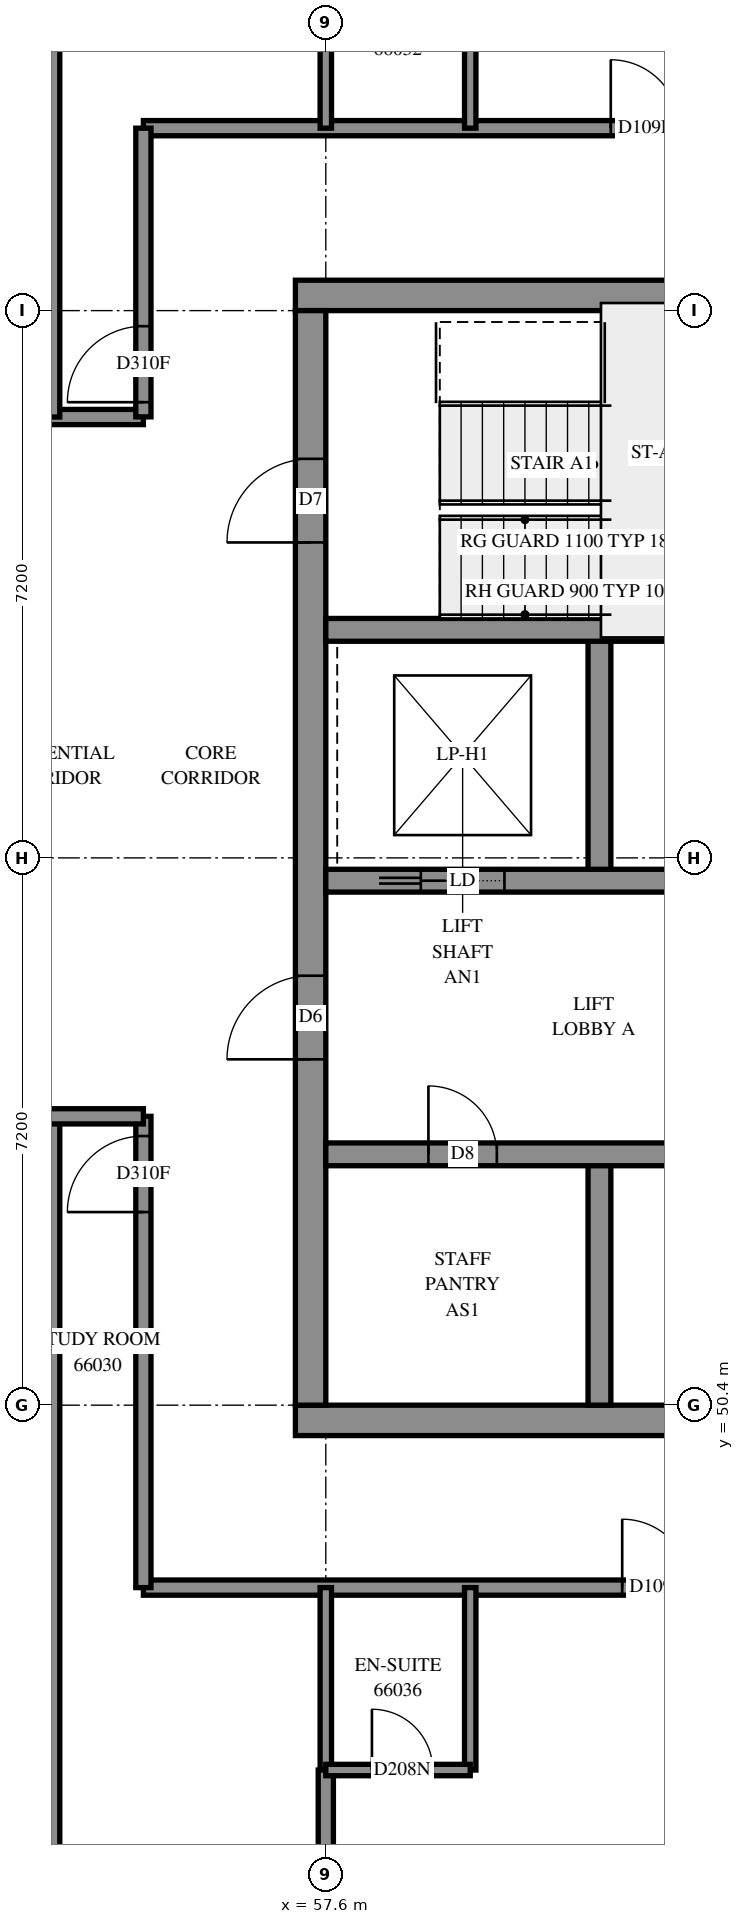
"""IFC4 building model, lengths in metres.
Left out: names, types, materials, properties, quantities, classifications, styles, units other than length and angle.
Written with IfcOpenShell. Run it as: python <this file> out.ifc"""

import sys

from ifc_helpers import new_model, si_unit, direction, frame, frame_2d, origin, place, context, subcontext, project, spatial, rectangle, extrude, element, fill, save


model = new_model("IFC4")
c1 = context("Model", 3, precision=1e-05, world=origin(), true_north=direction((0.0, 1.0)))
c2 = subcontext(c1, "Body", "Model", "MODEL_VIEW")
j1 = project(units=[si_unit("LENGTHUNIT", "METRE"), si_unit("PLANEANGLEUNIT", "RADIAN")], contexts=[c1])
p1 = place(None, origin())
s1 = spatial("IfcSite", under=j1, at=p1, CompositionType="ELEMENT")
p2 = place(p1, origin())
s2 = spatial("IfcBuilding", under=s1, at=p2, CompositionType="ELEMENT")
p3 = place(p2, frame((0.0, 0.0, 243.8)))
s3 = spatial("IfcBuildingStorey", under=s2, at=p3, CompositionType="ELEMENT", Elevation=243.8)
p4 = place(p3, frame((57.2, 50.2, -0.3), z_axis=(0.0, 0.0, 1.0), x_axis=(1.0, 0.0, 0.0)))
e1 = element("IfcWall", 1, at=p4, inside=s3, PredefinedType="SHEAR", context=c2, shape_type="SweptSolid", body=[
    extrude(rectangle(XDim=15.2, YDim=0.4, at=frame_2d((7.6, 0.0))), origin(), (0.0, 0.0, 1.0), 2.7),
])
p5 = place(p3, frame((57.2, 65.0, -0.3), z_axis=(0.0, 0.0, 1.0), x_axis=(1.0, 0.0, 0.0)))
e2 = element("IfcWall", 2, at=p5, inside=s3, PredefinedType="SHEAR", context=c2, shape_type="SweptSolid", body=[
    extrude(rectangle(XDim=15.2, YDim=0.4, at=frame_2d((7.6, 0.0))), origin(), (0.0, 0.0, 1.0), 2.7),
])
p6 = place(p5, frame((10.4, 0.0, 0.3)))
e3 = element("IfcOpeningElement", 3, at=p6, cuts=e2, PredefinedType="OPENING", context=c2, shape_type="SweptSolid", body=[
    extrude(rectangle(XDim=0.8, YDim=2.1, at=frame_2d((0.4, 1.05))), frame((0.0, 0.21, 0.0), z_axis=(0.0, -1.0, 0.0), x_axis=(1.0, 0.0, 0.0)), (0.0, 0.0, 1.0), 0.42),
])
p7 = place(p3, frame((57.4, 50.4, -0.3), z_axis=(0.0, 0.0, 1.0), x_axis=(0.0, 1.0, 0.0)))
e4 = element("IfcWall", 4, at=p7, inside=s3, PredefinedType="SHEAR", context=c2, shape_type="SweptSolid", body=[
    extrude(rectangle(XDim=14.4, YDim=0.4, at=frame_2d((7.2, 0.0))), origin(), (0.0, 0.0, 1.0), 2.7),
])
p8 = place(p7, frame((4.55, 0.0, 0.3)))
e5 = element("IfcOpeningElement", 5, at=p8, cuts=e4, PredefinedType="OPENING", context=c2, shape_type="SweptSolid", body=[
    extrude(rectangle(XDim=1.1, YDim=2.1, at=frame_2d((0.55, 1.05))), frame((0.0, 0.21, 0.0), z_axis=(0.0, -1.0, 0.0), x_axis=(1.0, 0.0, 0.0)), (0.0, 0.0, 1.0), 0.42),
])
p9 = place(p7, frame((11.35, 0.0, 0.3)))
e6 = element("IfcOpeningElement", 6, at=p9, cuts=e4, PredefinedType="OPENING", context=c2, shape_type="SweptSolid", body=[
    extrude(rectangle(XDim=1.1, YDim=2.1, at=frame_2d((0.55, 1.05))), frame((0.0, 0.21, 0.0), z_axis=(0.0, -1.0, 0.0), x_axis=(1.0, 0.0, 0.0)), (0.0, 0.0, 1.0), 0.42),
])
for number, where, z_axis, x_axis in (
    (7, (61.2, 50.4, 0.0), (0.0, 0.0, 1.0), (0.0, 1.0, 0.0)),
    (8, (61.2, 57.3, 0.0), (0.0, 0.0, 1.0), (0.0, 1.0, 0.0)),
):
    element("IfcWall", number, at=place(p3, frame(where, z_axis=z_axis, x_axis=x_axis)), inside=s3, PredefinedType="SOLIDWALL", context=c2, shape_type="SweptSolid", body=[
        extrude(rectangle(XDim=3.3, YDim=0.3, at=frame_2d((1.65, 0.0))), origin(), (0.0, 0.0, 1.0), 3.1),
    ])
p10 = place(p3, frame((57.6, 53.7, 0.0), z_axis=(0.0, 0.0, 1.0), x_axis=(1.0, 0.0, 0.0)))
e9 = element("IfcWall", 9, at=p10, inside=s3, PredefinedType="SOLIDWALL", context=c2, shape_type="SweptSolid", body=[
    extrude(rectangle(XDim=14.4, YDim=0.3, at=frame_2d((7.2, 0.0))), origin(), (0.0, 0.0, 1.0), 3.1),
])
p11 = place(p10, frame((1.35, 0.0, 0.0)))
e10 = element("IfcOpeningElement", 10, at=p11, cuts=e9, PredefinedType="OPENING", context=c2, shape_type="SweptSolid", body=[
    extrude(rectangle(XDim=0.9, YDim=2.1, at=frame_2d((0.45, 1.05))), frame((0.0, 0.16, 0.0), z_axis=(0.0, -1.0, 0.0), x_axis=(1.0, 0.0, 0.0)), (0.0, 0.0, 1.0), 0.32),
])
p12 = place(p10, frame((4.95, 0.0, 0.0)))
e11 = element("IfcOpeningElement", 11, at=p12, cuts=e9, PredefinedType="OPENING", context=c2, shape_type="SweptSolid", body=[
    extrude(rectangle(XDim=0.9, YDim=2.1, at=frame_2d((0.45, 1.05))), frame((0.0, 0.16, 0.0), z_axis=(0.0, -1.0, 0.0), x_axis=(1.0, 0.0, 0.0)), (0.0, 0.0, 1.0), 0.32),
])
p13 = place(p10, frame((8.55, 0.0, 0.0)))
e12 = element("IfcOpeningElement", 12, at=p13, cuts=e9, PredefinedType="OPENING", context=c2, shape_type="SweptSolid", body=[
    extrude(rectangle(XDim=0.9, YDim=2.1, at=frame_2d((0.45, 1.05))), frame((0.0, 0.16, 0.0), z_axis=(0.0, -1.0, 0.0), x_axis=(1.0, 0.0, 0.0)), (0.0, 0.0, 1.0), 0.32),
])
p14 = place(p10, frame((12.05, 0.0, 0.0)))
e13 = element("IfcOpeningElement", 13, at=p14, cuts=e9, PredefinedType="OPENING", context=c2, shape_type="SweptSolid", body=[
    extrude(rectangle(XDim=1.1, YDim=2.1, at=frame_2d((0.55, 1.05))), frame((0.0, 0.16, 0.0), z_axis=(0.0, -1.0, 0.0), x_axis=(1.0, 0.0, 0.0)), (0.0, 0.0, 1.0), 0.32),
])
p15 = place(p3, frame((57.6, 57.3, 0.0), z_axis=(0.0, 0.0, 1.0), x_axis=(1.0, 0.0, 0.0)))
e14 = element("IfcWall", 14, at=p15, inside=s3, PredefinedType="SOLIDWALL", context=c2, shape_type="SweptSolid", body=[
    extrude(rectangle(XDim=14.4, YDim=0.3, at=frame_2d((7.2, 0.0))), origin(), (0.0, 0.0, 1.0), 3.1),
])
p16 = place(p15, frame((8.55, 0.0, 0.0)))
e15 = element("IfcOpeningElement", 15, at=p16, cuts=e14, PredefinedType="OPENING", context=c2, shape_type="SweptSolid", body=[
    extrude(rectangle(XDim=0.9, YDim=2.1, at=frame_2d((0.45, 1.05))), frame((0.0, 0.16, 0.0), z_axis=(0.0, -1.0, 0.0), x_axis=(1.0, 0.0, 0.0)), (0.0, 0.0, 1.0), 0.32),
])
p17 = place(p15, frame((1.25, 0.0, 0.0)))
e16 = element("IfcOpeningElement", 16, at=p17, cuts=e14, PredefinedType="OPENING", context=c2, shape_type="SweptSolid", body=[
    extrude(rectangle(XDim=1.1, YDim=2.1, at=frame_2d((0.55, 1.05))), frame((0.0, 0.16, 0.0), z_axis=(0.0, -1.0, 0.0), x_axis=(1.0, 0.0, 0.0)), (0.0, 0.0, 1.0), 0.32),
])
p18 = place(p15, frame((4.85, 0.0, 0.0)))
e17 = element("IfcOpeningElement", 17, at=p18, cuts=e14, PredefinedType="OPENING", context=c2, shape_type="SweptSolid", body=[
    extrude(rectangle(XDim=1.1, YDim=2.1, at=frame_2d((0.55, 1.05))), frame((0.0, 0.16, 0.0), z_axis=(0.0, -1.0, 0.0), x_axis=(1.0, 0.0, 0.0)), (0.0, 0.0, 1.0), 0.32),
])
p19 = place(p15, frame((12.05, 0.0, 0.0)))
e18 = element("IfcOpeningElement", 18, at=p19, cuts=e14, PredefinedType="OPENING", context=c2, shape_type="SweptSolid", body=[
    extrude(rectangle(XDim=1.1, YDim=2.1, at=frame_2d((0.55, 1.05))), frame((0.0, 0.16, 0.0), z_axis=(0.0, -1.0, 0.0), x_axis=(1.0, 0.0, 0.0)), (0.0, 0.0, 1.0), 0.32),
])
p20 = place(p3, frame((57.6, 60.6, 0.0), z_axis=(0.0, 0.0, 1.0), x_axis=(1.0, 0.0, 0.0)))
e19 = element("IfcWall", 19, at=p20, inside=s3, PredefinedType="SOLIDWALL", context=c2, shape_type="SweptSolid", body=[
    extrude(rectangle(XDim=7.2, YDim=0.3, at=frame_2d((3.6, 0.0))), origin(), (0.0, 0.0, 1.0), 3.1),
])
p21 = place(p3, frame((55.2, 67.2, 0.0), z_axis=(0.0, 0.0, 1.0), x_axis=(1.0, 0.0, 0.0)))
e20 = element("IfcWall", 20, at=p21, inside=s3, PredefinedType="PARTITIONING", context=c2, shape_type="SweptSolid", body=[
    extrude(rectangle(XDim=19.2, YDim=0.2, at=frame_2d((9.6, 0.0))), origin(), (0.0, 0.0, 1.0), 3.1),
])
p22 = place(p21, frame((6.149, 0.0, 0.0)))
e21 = element("IfcOpeningElement", 21, at=p22, cuts=e20, PredefinedType="OPENING", context=c2, shape_type="SweptSolid", body=[
    extrude(rectangle(XDim=0.9, YDim=2.1, at=frame_2d((0.45, 1.05))), frame((0.0, 0.11, 0.0), z_axis=(0.0, -1.0, 0.0), x_axis=(1.0, 0.0, 0.0)), (0.0, 0.0, 1.0), 0.22),
])
p23 = place(p21, frame((13.499, 0.0, 0.0)))
e22 = element("IfcOpeningElement", 22, at=p23, cuts=e20, PredefinedType="OPENING", context=c2, shape_type="SweptSolid", body=[
    extrude(rectangle(XDim=0.9, YDim=2.1, at=frame_2d((0.45, 1.05))), frame((0.0, 0.11, 0.0), z_axis=(0.0, -1.0, 0.0), x_axis=(1.0, 0.0, 0.0)), (0.0, 0.0, 1.0), 0.22),
])
p24 = place(p3, frame((55.2, 48.0, 0.0), z_axis=(0.0, 0.0, 1.0), x_axis=(1.0, 0.0, 0.0)))
e23 = element("IfcWall", 23, at=p24, inside=s3, PredefinedType="PARTITIONING", context=c2, shape_type="SweptSolid", body=[
    extrude(rectangle(XDim=19.15, YDim=0.2, at=frame_2d((9.575, 0.0))), origin(), (0.0, 0.0, 1.0), 3.1),
])
p25 = place(p24, frame((6.299, 0.0, 0.0)))
e24 = element("IfcOpeningElement", 24, at=p25, cuts=e23, PredefinedType="OPENING", context=c2, shape_type="SweptSolid", body=[
    extrude(rectangle(XDim=0.9, YDim=2.1, at=frame_2d((0.45, 1.05))), frame((0.0, 0.11, 0.0), z_axis=(0.0, -1.0, 0.0), x_axis=(1.0, 0.0, 0.0)), (0.0, 0.0, 1.0), 0.22),
])
p26 = place(p24, frame((13.499, 0.0, 0.0)))
e25 = element("IfcOpeningElement", 25, at=p26, cuts=e23, PredefinedType="OPENING", context=c2, shape_type="SweptSolid", body=[
    extrude(rectangle(XDim=0.9, YDim=2.1, at=frame_2d((0.45, 1.05))), frame((0.0, 0.11, 0.0), z_axis=(0.0, -1.0, 0.0), x_axis=(1.0, 0.0, 0.0)), (0.0, 0.0, 1.0), 0.22),
])
p27 = place(p3, frame((40.61, 63.4, 0.0), z_axis=(0.0, 0.0, 1.0), x_axis=(1.0, 0.0, 0.0)))
e26 = element("IfcWall", 26, at=p27, inside=s3, PredefinedType="PARTITIONING", context=c2, shape_type="SweptSolid", body=[
    extrude(rectangle(XDim=14.59, YDim=0.2, at=frame_2d((7.295, 0.0))), origin(), (0.0, 0.0, 1.0), 3.1),
])
p28 = place(p27, frame((6.3, 0.0, 0.0)))
e27 = element("IfcOpeningElement", 27, at=p28, cuts=e26, PredefinedType="OPENING", context=c2, shape_type="SweptSolid", body=[
    extrude(rectangle(XDim=1.0, YDim=2.1, at=frame_2d((0.5, 1.05))), frame((0.0, 0.11, 0.0), z_axis=(0.0, -1.0, 0.0), x_axis=(1.0, 0.0, 0.0)), (0.0, 0.0, 1.0), 0.22),
])
p29 = place(p27, frame((11.73, 0.0, 0.0)))
e28 = element("IfcOpeningElement", 28, at=p29, cuts=e26, PredefinedType="OPENING", context=c2, shape_type="SweptSolid", body=[
    extrude(rectangle(XDim=1.0, YDim=2.1, at=frame_2d((0.5, 1.05))), frame((0.0, 0.11, 0.0), z_axis=(0.0, -1.0, 0.0), x_axis=(1.0, 0.0, 0.0)), (0.0, 0.0, 1.0), 0.22),
])
p30 = place(p3, frame((54.0, 42.35, 0.0), z_axis=(0.0, 0.0, 1.0), x_axis=(0.0, 1.0, 0.0)))
e29 = element("IfcWall", 29, at=p30, inside=s3, PredefinedType="PARTITIONING", context=c2, shape_type="SweptSolid", body=[
    extrude(rectangle(XDim=11.85, YDim=0.2, at=frame_2d((5.925, 0.0))), origin(), (0.0, 0.0, 1.0), 3.1),
])
p31 = place(p3, frame((54.0, 63.4, 0.0), z_axis=(0.0, 0.0, 1.0), x_axis=(0.0, 1.0, 0.0)))
e30 = element("IfcWall", 30, at=p31, inside=s3, PredefinedType="PARTITIONING", context=c2, shape_type="SweptSolid", body=[
    extrude(rectangle(XDim=9.397, YDim=0.2, at=frame_2d((4.699, 0.0))), origin(), (0.0, 0.0, 1.0), 3.1),
])
p32 = place(p3, frame((55.2, 48.0, 0.0), z_axis=(0.0, 0.0, 1.0), x_axis=(0.0, 1.0, 0.0)))
e31 = element("IfcWall", 31, at=p32, inside=s3, PredefinedType="PARTITIONING", context=c2, shape_type="SweptSolid", body=[
    extrude(rectangle(XDim=6.2, YDim=0.2, at=frame_2d((3.1, 0.0))), origin(), (0.0, 0.0, 1.0), 3.1),
])
p33 = place(p32, frame((4.94, 0.0, 0.0)))
e32 = element("IfcOpeningElement", 32, at=p33, cuts=e31, PredefinedType="OPENING", context=c2, shape_type="SweptSolid", body=[
    extrude(rectangle(XDim=1.0, YDim=2.1, at=frame_2d((0.5, 1.05))), frame((0.0, 0.11, 0.0), z_axis=(0.0, -1.0, 0.0), x_axis=(1.0, 0.0, 0.0)), (0.0, 0.0, 1.0), 0.22),
])
p34 = place(p3, frame((50.4, 54.2, 0.0), z_axis=(0.0, 0.0, 1.0), x_axis=(1.0, 0.0, 0.0)))
e33 = element("IfcWall", 33, at=p34, inside=s3, PredefinedType="PARTITIONING", context=c2, shape_type="SweptSolid", body=[
    extrude(rectangle(XDim=4.8, YDim=0.2, at=frame_2d((2.4, 0.0))), origin(), (0.0, 0.0, 1.0), 3.1),
])
p35 = place(p34, frame((2.033, 0.0, 0.0)))
e34 = element("IfcOpeningElement", 34, at=p35, cuts=e33, PredefinedType="OPENING", context=c2, shape_type="SweptSolid", body=[
    extrude(rectangle(XDim=1.0, YDim=2.1, at=frame_2d((0.5, 1.05))), frame((0.0, 0.11, 0.0), z_axis=(0.0, -1.0, 0.0), x_axis=(1.0, 0.0, 0.0)), (0.0, 0.0, 1.0), 0.22),
])
p36 = place(p3, frame((55.2, 63.402, 0.0), z_axis=(0.0, 0.0, 1.0), x_axis=(0.0, 1.0, 0.0)))
e35 = element("IfcWall", 35, at=p36, inside=s3, PredefinedType="PARTITIONING", context=c2, shape_type="SweptSolid", body=[
    extrude(rectangle(XDim=3.798, YDim=0.2, at=frame_2d((1.899, 0.0))), origin(), (0.0, 0.0, 1.0), 3.1),
])
p37 = place(p36, frame((0.193, 0.0, 0.0)))
e36 = element("IfcOpeningElement", 36, at=p37, cuts=e35, PredefinedType="OPENING", context=c2, shape_type="SweptSolid", body=[
    extrude(rectangle(XDim=1.0, YDim=2.1, at=frame_2d((0.5, 1.05))), frame((0.0, 0.11, 0.0), z_axis=(0.0, -1.0, 0.0), x_axis=(1.0, 0.0, 0.0)), (0.0, 0.0, 1.0), 0.22),
])
for number, where, z_axis, x_axis in (
    (37, (59.5, 45.6, 0.0), (0.0, 0.0, 1.0), (0.0, 1.0, 0.0)),
    (38, (57.6, 45.6, 0.0), (0.0, 0.0, 1.0), (0.0, 1.0, 0.0)),
    (39, (59.5, 67.2, 0.0), (0.0, 0.0, 1.0), (0.0, 1.0, 0.0)),
    (40, (57.6, 67.2, 0.0), (0.0, 0.0, 1.0), (0.0, 1.0, 0.0)),
):
    element("IfcWall", number, at=place(p3, frame(where, z_axis=z_axis, x_axis=x_axis)), inside=s3, PredefinedType="PARTITIONING", context=c2, shape_type="SweptSolid", body=[
        extrude(rectangle(XDim=2.4, YDim=0.15, at=frame_2d((1.2, 0.0))), origin(), (0.0, 0.0, 1.0), 3.1),
    ])
p38 = place(p3, frame((57.6, 43.55, 0.0), z_axis=(0.0, 0.0, 1.0), x_axis=(0.0, 1.0, 0.0)))
e41 = element("IfcWall", 41, at=p38, inside=s3, PredefinedType="PARTITIONING", context=c2, shape_type="SweptSolid", body=[
    extrude(rectangle(XDim=2.05, YDim=0.2, at=frame_2d((1.025, 0.0))), origin(), (0.0, 0.0, 1.0), 3.1),
])
p39 = place(p3, frame((57.6, 45.6, 0.0), z_axis=(0.0, 0.0, 1.0), x_axis=(1.0, 0.0, 0.0)))
e42 = element("IfcWall", 42, at=p39, inside=s3, PredefinedType="PARTITIONING", context=c2, shape_type="SweptSolid", body=[
    extrude(rectangle(XDim=1.9, YDim=0.15, at=frame_2d((0.95, 0.0))), origin(), (0.0, 0.0, 1.0), 3.1),
])
p40 = place(p39, frame((0.607, 0.0, 0.0)))
e43 = element("IfcOpeningElement", 43, at=p40, cuts=e42, PredefinedType="OPENING", context=c2, shape_type="SweptSolid", body=[
    extrude(rectangle(XDim=0.8, YDim=2.1, at=frame_2d((0.4, 1.05))), frame((0.0, 0.085, 0.0), z_axis=(0.0, -1.0, 0.0), x_axis=(1.0, 0.0, 0.0)), (0.0, 0.0, 1.0), 0.17),
])
p41 = place(p8, origin())
e44 = element("IfcDoor", 44, at=p41, inside=s3, OperationType="DOUBLE_DOOR_SINGLE_SWING", PredefinedType="DOOR", context=c2, shape_type="SweptSolid", body=[
    extrude(rectangle(XDim=1.1, YDim=2.1, at=frame_2d((0.55, 1.05))), frame((0.0, 0.025, 0.0), z_axis=(0.0, -1.0, 0.0), x_axis=(1.0, 0.0, 0.0)), (0.0, 0.0, 1.0), 0.05),
])
fill(e5, e44)
p42 = place(p9, origin())
e45 = element("IfcDoor", 45, at=p42, inside=s3, OperationType="SINGLE_SWING_LEFT", PredefinedType="DOOR", context=c2, shape_type="SweptSolid", body=[
    extrude(rectangle(XDim=1.1, YDim=2.1, at=frame_2d((0.55, 1.05))), frame((0.0, 0.025, 0.0), z_axis=(0.0, -1.0, 0.0), x_axis=(1.0, 0.0, 0.0)), (0.0, 0.0, 1.0), 0.05),
])
fill(e6, e45)
p43 = place(p11, origin())
e46 = element("IfcDoor", 46, at=p43, inside=s3, OperationType="SINGLE_SWING_LEFT", PredefinedType="DOOR", context=c2, shape_type="SweptSolid", body=[
    extrude(rectangle(XDim=0.9, YDim=2.1, at=frame_2d((0.45, 1.05))), frame((0.0, 0.025, 0.0), z_axis=(0.0, -1.0, 0.0), x_axis=(1.0, 0.0, 0.0)), (0.0, 0.0, 1.0), 0.05),
])
fill(e10, e46)
p44 = place(p17, origin())
e47 = element("IfcDoor", 47, at=p44, inside=s3, OperationType="SLIDING_TO_LEFT", PredefinedType="DOOR", context=c2, shape_type="SweptSolid", body=[
    extrude(rectangle(XDim=1.1, YDim=2.1, at=frame_2d((0.55, 1.05))), frame((0.0, 0.025, 0.0), z_axis=(0.0, -1.0, 0.0), x_axis=(1.0, 0.0, 0.0)), (0.0, 0.0, 1.0), 0.05),
])
fill(e16, e47)
p45 = place(p37, origin())
e48 = element("IfcDoor", 48, at=p45, inside=s3, OperationType="SINGLE_SWING_LEFT", PredefinedType="DOOR", context=c2, shape_type="SweptSolid", body=[
    extrude(rectangle(XDim=1.0, YDim=2.1, at=frame_2d((0.5, 1.05))), frame((0.0, 0.025, 0.0), z_axis=(0.0, -1.0, 0.0), x_axis=(1.0, 0.0, 0.0)), (0.0, 0.0, 1.0), 0.05),
])
fill(e36, e48)
p46 = place(p33, origin())
e49 = element("IfcDoor", 49, at=p46, inside=s3, OperationType="SINGLE_SWING_RIGHT", PredefinedType="DOOR", context=c2, shape_type="SweptSolid", body=[
    extrude(rectangle(XDim=1.0, YDim=2.1, at=frame_2d((0.5, 1.05))), frame((0.0, 0.025, 0.0), z_axis=(0.0, -1.0, 0.0), x_axis=(1.0, 0.0, 0.0)), (0.0, 0.0, 1.0), 0.05),
])
fill(e32, e49)
p47 = place(p22, origin())
e50 = element("IfcDoor", 50, at=p47, inside=s3, OperationType="SINGLE_SWING_RIGHT", PredefinedType="DOOR", context=c2, shape_type="SweptSolid", body=[
    extrude(rectangle(XDim=0.9, YDim=2.1, at=frame_2d((0.45, 1.05))), frame((0.0, 0.025, 0.0), z_axis=(0.0, -1.0, 0.0), x_axis=(1.0, 0.0, 0.0)), (0.0, 0.0, 1.0), 0.05),
])
fill(e21, e50)
p48 = place(p25, origin())
e51 = element("IfcDoor", 51, at=p48, inside=s3, OperationType="SINGLE_SWING_LEFT", PredefinedType="DOOR", context=c2, shape_type="SweptSolid", body=[
    extrude(rectangle(XDim=0.9, YDim=2.1, at=frame_2d((0.45, 1.05))), frame((0.0, 0.025, 0.0), z_axis=(0.0, -1.0, 0.0), x_axis=(1.0, 0.0, 0.0)), (0.0, 0.0, 1.0), 0.05),
])
fill(e24, e51)
p49 = place(p40, origin())
e52 = element("IfcDoor", 52, at=p49, inside=s3, OperationType="SINGLE_SWING_RIGHT", PredefinedType="DOOR", context=c2, shape_type="SweptSolid", body=[
    extrude(rectangle(XDim=0.8, YDim=2.1, at=frame_2d((0.4, 1.05))), frame((0.0, 0.025, 0.0), z_axis=(0.0, -1.0, 0.0), x_axis=(1.0, 0.0, 0.0)), (0.0, 0.0, 1.0), 0.05),
])
fill(e43, e52)
save(model, sys.argv[1])
